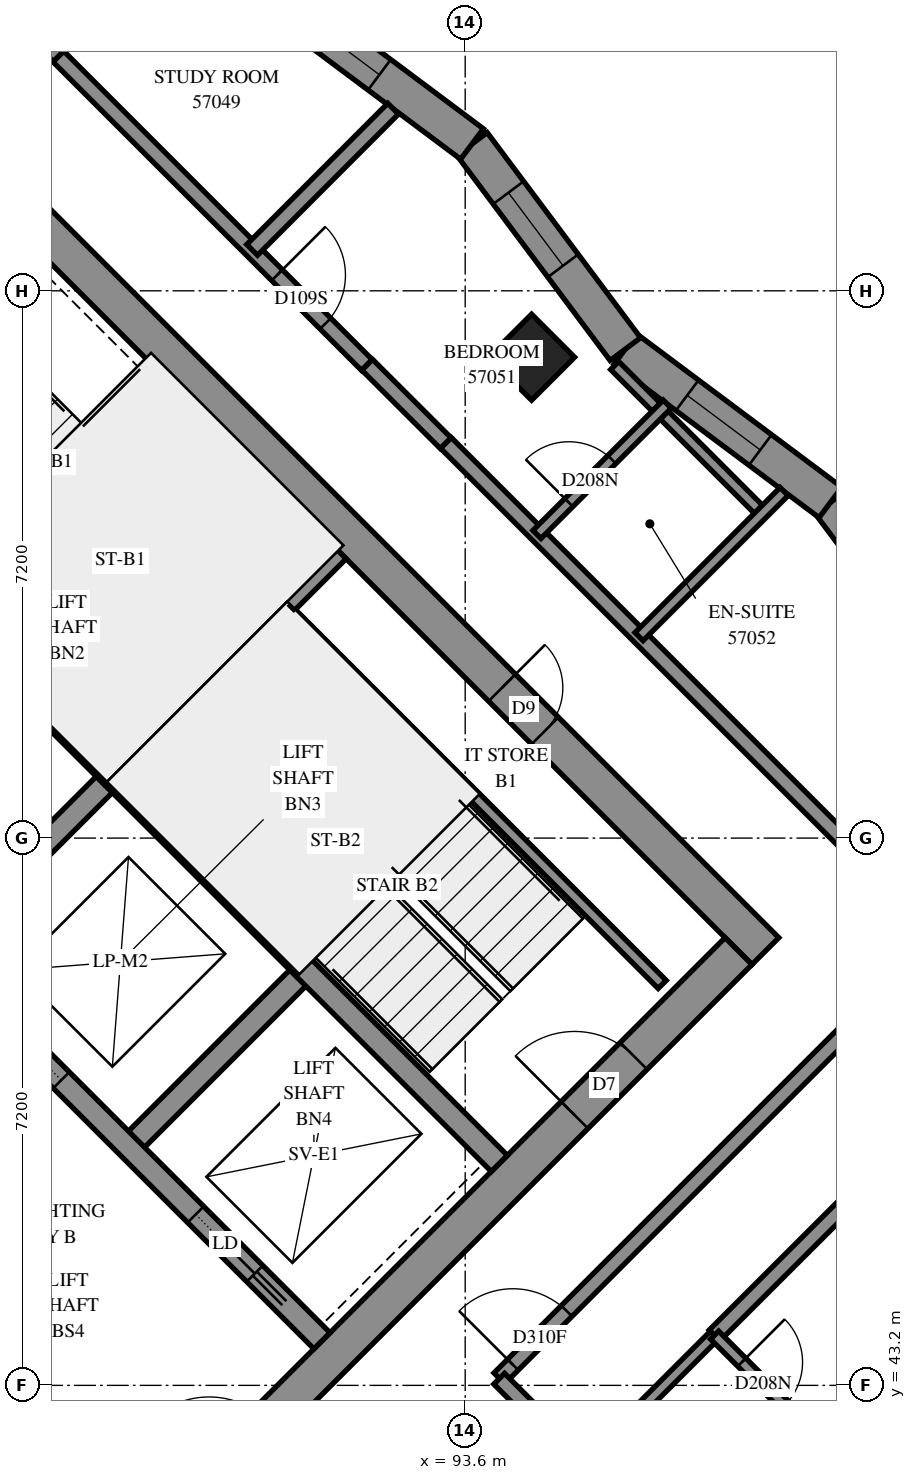
"""IFC4 building model, lengths in metres.
Left out: names, types, materials, properties, quantities, classifications, styles, units other than length and angle.
Written with IfcOpenShell. Run it as: python <this file> out.ifc"""

import sys

from ifc_helpers import new_model, si_unit, direction, frame, frame_2d, origin, origin_2d, place, context, subcontext, project, spatial, polyline, rectangle, outline, extrude, element, fill, save


model = new_model("IFC4")
c1 = context("Model", 3, precision=1e-05, world=origin(), true_north=direction((0.0, 1.0)))
c2 = subcontext(c1, "Body", "Model", "MODEL_VIEW")
j1 = project(units=[si_unit("LENGTHUNIT", "METRE"), si_unit("PLANEANGLEUNIT", "RADIAN")], contexts=[c1])
p1 = place(None, origin())
s1 = spatial("IfcSite", under=j1, at=p1, CompositionType="ELEMENT")
p2 = place(p1, origin())
s2 = spatial("IfcBuilding", under=s1, at=p2, CompositionType="ELEMENT")
p3 = place(p2, frame((0.0, 0.0, 210.0)))
s3 = spatial("IfcBuildingStorey", under=s2, at=p3, CompositionType="ELEMENT", Elevation=210.0)
p4 = place(p3, frame((94.474, 56.727, 0.0), z_axis=(0.0, 0.0, 1.0), x_axis=(0.7071067812, -0.7071067812, 0.0)))
e1 = element("IfcColumn", 1, at=p4, inside=s3, PredefinedType="COLUMN", context=c2, shape_type="SweptSolid", body=[
    extrude(rectangle(XDim=0.8, YDim=0.8, at=origin_2d()), origin(), (0.0, 0.0, 1.0), 3.1),
])
p5 = place(p3, frame((86.66, 59.802, -0.3), z_axis=(0.0, 0.0, 1.0), x_axis=(0.7071067812, -0.7071067812, 0.0)))
e2 = element("IfcWall", 2, at=p5, inside=s3, PredefinedType="SHEAR", context=c2, shape_type="SweptSolid", body=[
    extrude(rectangle(XDim=15.4, YDim=0.5, at=frame_2d((7.7, 0.0))), origin(), (0.0, 0.0, 1.0), 2.7),
])
p6 = place(p5, frame((10.5, 0.0, 0.3)))
e3 = element("IfcOpeningElement", 3, at=p6, cuts=e2, PredefinedType="OPENING", context=c2, shape_type="SweptSolid", body=[
    extrude(rectangle(XDim=0.8, YDim=2.1, at=frame_2d((0.4, 1.05))), frame((0.0, 0.26, 0.0), z_axis=(0.0, -1.0, 0.0), x_axis=(1.0, 0.0, 0.0)), (0.0, 0.0, 1.0), 0.52),
])
p7 = place(p3, frame((87.013, 38.731, -0.3), z_axis=(0.0, 0.0, 1.0), x_axis=(0.7071067812, 0.7071067812, 0.0)))
e4 = element("IfcWall", 4, at=p7, inside=s3, PredefinedType="SHEAR", context=c2, shape_type="SweptSolid", body=[
    extrude(rectangle(XDim=14.4, YDim=0.5, at=frame_2d((7.2, 0.0))), origin(), (0.0, 0.0, 1.0), 2.7),
])
p8 = place(p7, frame((4.55, 0.0, 0.3)))
e5 = element("IfcOpeningElement", 5, at=p8, cuts=e4, PredefinedType="OPENING", context=c2, shape_type="SweptSolid", body=[
    extrude(rectangle(XDim=1.1, YDim=2.1, at=frame_2d((0.55, 1.05))), frame((0.0, 0.26, 0.0), z_axis=(0.0, -1.0, 0.0), x_axis=(1.0, 0.0, 0.0)), (0.0, 0.0, 1.0), 0.52),
])
p9 = place(p7, frame((11.35, 0.0, 0.3)))
e6 = element("IfcOpeningElement", 6, at=p9, cuts=e4, PredefinedType="OPENING", context=c2, shape_type="SweptSolid", body=[
    extrude(rectangle(XDim=1.1, YDim=2.1, at=frame_2d((0.55, 1.05))), frame((0.0, 0.26, 0.0), z_axis=(0.0, -1.0, 0.0), x_axis=(1.0, 0.0, 0.0)), (0.0, 0.0, 1.0), 0.52),
])
for number, where, z_axis, x_axis in (
    (7, (86.625, 48.878, 0.0), (0.0, 0.0, 1.0), (0.707, 0.707, 0.0)),
    (8, (89.17, 46.332, 0.0), (0.0, 0.0, 1.0), (0.707, 0.707, 0.0)),
):
    element("IfcWall", number, at=place(p3, frame(where, z_axis=z_axis, x_axis=x_axis)), inside=s3, PredefinedType="SOLIDWALL", context=c2, shape_type="SweptSolid", body=[
        extrude(rectangle(XDim=3.3, YDim=0.3, at=frame_2d((1.65, 0.0))), origin(), (0.0, 0.0, 1.0), 3.1),
    ])
p10 = place(p3, frame((78.988, 51.423, 0.0), z_axis=(0.0, 0.0, 1.0), x_axis=(0.7071067812, -0.7071067812, 0.0)))
e9 = element("IfcWall", 9, at=p10, inside=s3, PredefinedType="SOLIDWALL", context=c2, shape_type="SweptSolid", body=[
    extrude(rectangle(XDim=14.4, YDim=0.3, at=frame_2d((7.2, 0.0))), origin(), (0.0, 0.0, 1.0), 3.1),
])
p11 = place(p10, frame((1.35, 0.0, 0.0)))
e10 = element("IfcOpeningElement", 10, at=p11, cuts=e9, PredefinedType="OPENING", context=c2, shape_type="SweptSolid", body=[
    extrude(rectangle(XDim=0.9, YDim=2.1, at=frame_2d((0.45, 1.05))), frame((0.0, 0.16, 0.0), z_axis=(0.0, -1.0, 0.0), x_axis=(1.0, 0.0, 0.0)), (0.0, 0.0, 1.0), 0.32),
])
p12 = place(p10, frame((4.95, 0.0, 0.0)))
e11 = element("IfcOpeningElement", 11, at=p12, cuts=e9, PredefinedType="OPENING", context=c2, shape_type="SweptSolid", body=[
    extrude(rectangle(XDim=0.9, YDim=2.1, at=frame_2d((0.45, 1.05))), frame((0.0, 0.16, 0.0), z_axis=(0.0, -1.0, 0.0), x_axis=(1.0, 0.0, 0.0)), (0.0, 0.0, 1.0), 0.32),
])
p13 = place(p10, frame((8.55, 0.0, 0.0)))
e12 = element("IfcOpeningElement", 12, at=p13, cuts=e9, PredefinedType="OPENING", context=c2, shape_type="SweptSolid", body=[
    extrude(rectangle(XDim=0.9, YDim=2.1, at=frame_2d((0.45, 1.05))), frame((0.0, 0.16, 0.0), z_axis=(0.0, -1.0, 0.0), x_axis=(1.0, 0.0, 0.0)), (0.0, 0.0, 1.0), 0.32),
])
p14 = place(p10, frame((12.05, 0.0, 0.0)))
e13 = element("IfcOpeningElement", 13, at=p14, cuts=e9, PredefinedType="OPENING", context=c2, shape_type="SweptSolid", body=[
    extrude(rectangle(XDim=1.1, YDim=2.1, at=frame_2d((0.55, 1.05))), frame((0.0, 0.16, 0.0), z_axis=(0.0, -1.0, 0.0), x_axis=(1.0, 0.0, 0.0)), (0.0, 0.0, 1.0), 0.32),
])
p15 = place(p3, frame((81.534, 53.969, 0.0), z_axis=(0.0, 0.0, 1.0), x_axis=(0.707103309, -0.7071102534, 0.0)))
e14 = element("IfcWall", 14, at=p15, inside=s3, PredefinedType="SOLIDWALL", context=c2, shape_type="SweptSolid", body=[
    extrude(rectangle(XDim=14.4, YDim=0.3, at=frame_2d((7.2, 0.0))), origin(), (0.0, 0.0, 1.0), 3.1),
])
p16 = place(p15, frame((1.25, 0.0, 0.0)))
e15 = element("IfcOpeningElement", 15, at=p16, cuts=e14, PredefinedType="OPENING", context=c2, shape_type="SweptSolid", body=[
    extrude(rectangle(XDim=1.1, YDim=2.1, at=frame_2d((0.55, 1.05))), frame((0.0, 0.16, 0.0), z_axis=(0.0, -1.0, 0.0), x_axis=(1.0, 0.0, 0.0)), (0.0, 0.0, 1.0), 0.32),
])
p17 = place(p15, frame((4.85, 0.0, 0.0)))
e16 = element("IfcOpeningElement", 16, at=p17, cuts=e14, PredefinedType="OPENING", context=c2, shape_type="SweptSolid", body=[
    extrude(rectangle(XDim=1.1, YDim=2.1, at=frame_2d((0.55, 1.05))), frame((0.0, 0.16, 0.0), z_axis=(0.0, -1.0, 0.0), x_axis=(1.0, 0.0, 0.0)), (0.0, 0.0, 1.0), 0.32),
])
p18 = place(p15, frame((8.45, 0.0, 0.0)))
e17 = element("IfcOpeningElement", 17, at=p18, cuts=e14, PredefinedType="OPENING", context=c2, shape_type="SweptSolid", body=[
    extrude(rectangle(XDim=1.1, YDim=2.1, at=frame_2d((0.55, 1.05))), frame((0.0, 0.16, 0.0), z_axis=(0.0, -1.0, 0.0), x_axis=(1.0, 0.0, 0.0)), (0.0, 0.0, 1.0), 0.32),
])
p19 = place(p15, frame((12.05, 0.0, 0.0)))
e18 = element("IfcOpeningElement", 18, at=p19, cuts=e14, PredefinedType="OPENING", context=c2, shape_type="SweptSolid", body=[
    extrude(rectangle(XDim=1.1, YDim=2.1, at=frame_2d((0.55, 1.05))), frame((0.0, 0.16, 0.0), z_axis=(0.0, -1.0, 0.0), x_axis=(1.0, 0.0, 0.0)), (0.0, 0.0, 1.0), 0.32),
])
for number, where, z_axis, x_axis in (
    (19, (83.867, 56.302, 0.0), (0.0, 0.0, 1.0), (0.707, -0.707, 0.0)),
    (20, (88.958, 51.211, 0.0), (0.0, 0.0, 1.0), (0.707, -0.707, 0.0)),
):
    element("IfcWall", number, at=place(p3, frame(where, z_axis=z_axis, x_axis=x_axis)), inside=s3, PredefinedType="SOLIDWALL", context=c2, shape_type="SweptSolid", body=[
        extrude(rectangle(XDim=7.2, YDim=0.3, at=frame_2d((3.6, 0.0))), origin(), (0.0, 0.0, 1.0), 3.1),
    ])
p20 = place(p3, frame((88.958, 51.211, 0.0), z_axis=(0.0, 0.0, 1.0), x_axis=(0.7071067812, 0.7071067812, 0.0)))
e21 = element("IfcWall", 21, at=p20, inside=s3, PredefinedType="SOLIDWALL", context=c2, shape_type="SweptSolid", body=[
    extrude(rectangle(XDim=4.2, YDim=0.3, at=frame_2d((2.1, 0.0))), origin(), (0.0, 0.0, 1.0), 3.1),
])
p21 = place(p3, frame((100.436, 52.1, 0.0), z_axis=(0.0, 0.0, 1.0), x_axis=(-0.5986733779, 0.8009932501, 0.0)))
e22 = element("IfcWall", 22, at=p21, inside=s3, PredefinedType="SOLIDWALL", context=c2, shape_type="SweptSolid", body=[
    extrude(outline(polyline([(0.058, -0.25), (3.427, -0.25), (3.355, 0.25), (-0.058, 0.25), (0.058, -0.25)])), origin(), (0.0, 0.0, 1.0), 3.1),
])
p22 = place(p21, frame((1.077, 0.0, 0.45)))
e23 = element("IfcOpeningElement", 23, at=p22, cuts=e22, PredefinedType="OPENING", context=c2, shape_type="SweptSolid", body=[
    extrude(rectangle(XDim=1.2, YDim=2.5, at=frame_2d((0.6, 1.25))), frame((0.0, 0.26, 0.0), z_axis=(0.0, -1.0, 0.0), x_axis=(1.0, 0.0, 0.0)), (0.0, 0.0, 1.0), 0.52),
])
p23 = place(p3, frame((98.405, 54.816, 0.0), z_axis=(0.0, 0.0, 1.0), x_axis=(-0.8009854957, 0.5986837527, 0.0)))
e24 = element("IfcWall", 24, at=p23, inside=s3, PredefinedType="SOLIDWALL", context=c2, shape_type="SweptSolid", body=[
    extrude(outline(polyline([(-0.036, -0.25), (3.333, -0.25), (3.405, 0.25), (0.036, 0.25), (-0.036, -0.25)])), origin(), (0.0, 0.0, 1.0), 3.1),
])
p24 = place(p23, frame((1.153, 0.0, 0.45)))
e25 = element("IfcOpeningElement", 25, at=p24, cuts=e24, PredefinedType="OPENING", context=c2, shape_type="SweptSolid", body=[
    extrude(rectangle(XDim=1.2, YDim=2.5, at=frame_2d((0.6, 1.25))), frame((0.0, 0.26, 0.0), z_axis=(0.0, -1.0, 0.0), x_axis=(1.0, 0.0, 0.0)), (0.0, 0.0, 1.0), 0.52),
])
p25 = place(p3, frame((95.707, 56.833, 0.0), z_axis=(0.0, 0.0, 1.0), x_axis=(-0.5986647099, 0.8009997286, 0.0)))
e26 = element("IfcWall", 26, at=p25, inside=s3, PredefinedType="SOLIDWALL", context=c2, shape_type="SweptSolid", body=[
    extrude(outline(polyline([(0.036, -0.25), (3.405, -0.25), (3.333, 0.25), (-0.036, 0.25), (0.036, -0.25)])), origin(), (0.0, 0.0, 1.0), 3.1),
])
p26 = place(p25, frame((1.369, 0.0, 0.45)))
e27 = element("IfcOpeningElement", 27, at=p26, cuts=e26, PredefinedType="OPENING", context=c2, shape_type="SweptSolid", body=[
    extrude(rectangle(XDim=1.2, YDim=2.5, at=frame_2d((0.6, 1.25))), frame((0.0, 0.26, 0.0), z_axis=(0.0, -1.0, 0.0), x_axis=(1.0, 0.0, 0.0)), (0.0, 0.0, 1.0), 0.52),
])
p27 = place(p3, frame((93.69, 59.532, 0.0), z_axis=(0.0, 0.0, 1.0), x_axis=(-0.8009997286, 0.5986647099, 0.0)))
e28 = element("IfcWall", 28, at=p27, inside=s3, PredefinedType="SOLIDWALL", context=c2, shape_type="SweptSolid", body=[
    extrude(outline(polyline([(-0.036, -0.25), (3.333, -0.25), (3.405, 0.25), (0.036, 0.25), (-0.036, -0.25)])), origin(), (0.0, 0.0, 1.0), 3.1),
])
p28 = place(p27, frame((1.521, 0.0, 0.45)))
e29 = element("IfcOpeningElement", 29, at=p28, cuts=e28, PredefinedType="OPENING", context=c2, shape_type="SweptSolid", body=[
    extrude(rectangle(XDim=1.2, YDim=2.5, at=frame_2d((0.6, 1.25))), frame((0.0, 0.26, 0.0), z_axis=(0.0, -1.0, 0.0), x_axis=(1.0, 0.0, 0.0)), (0.0, 0.0, 1.0), 0.52),
])
p29 = place(p3, frame((91.313, 53.354, 0.0), z_axis=(0.0, 0.0, 1.0), x_axis=(0.7071140275, -0.7070995348, 0.0)))
e30 = element("IfcWall", 30, at=p29, inside=s3, PredefinedType="PARTITIONING", context=c2, shape_type="SweptSolid", body=[
    extrude(rectangle(XDim=6.9, YDim=0.15, at=frame_2d((3.45, 0.0))), origin(), (0.0, 0.0, 1.0), 3.1),
])
p30 = place(p3, frame((93.346, 55.599, 0.0), z_axis=(0.0, 0.0, 1.0), x_axis=(0.7071067812, -0.7071067812, 0.0)))
e31 = element("IfcWall", 31, at=p30, inside=s3, PredefinedType="PARTITIONING", context=c2, shape_type="SweptSolid", body=[
    extrude(rectangle(XDim=9.201, YDim=0.2, at=frame_2d((4.601, 0.0))), origin(), (0.0, 0.0, 1.0), 3.1),
])
p31 = place(p3, frame((94.049, 43.293, 0.0), z_axis=(0.0, 0.0, 1.0), x_axis=(0.7071067812, 0.7071067812, 0.0)))
e32 = element("IfcWall", 32, at=p31, inside=s3, PredefinedType="PARTITIONING", context=c2, shape_type="SweptSolid", body=[
    extrude(rectangle(XDim=8.2, YDim=0.2, at=frame_2d((4.1, 0.0))), origin(), (0.0, 0.0, 1.0), 3.1),
])
p32 = place(p31, frame((0.252, 0.0, 0.0)))
e33 = element("IfcOpeningElement", 33, at=p32, cuts=e32, PredefinedType="OPENING", context=c2, shape_type="SweptSolid", body=[
    extrude(rectangle(XDim=1.0, YDim=2.1, at=frame_2d((0.5, 1.05))), frame((0.0, 0.11, 0.0), z_axis=(0.0, -1.0, 0.0), x_axis=(1.0, 0.0, 0.0)), (0.0, 0.0, 1.0), 0.22),
])
p33 = place(p3, frame((88.247, 60.683, 0.0), z_axis=(0.0, 0.0, 1.0), x_axis=(0.7071067812, -0.7071067812, 0.0)))
e34 = element("IfcWall", 34, at=p33, inside=s3, PredefinedType="PARTITIONING", context=c2, shape_type="SweptSolid", body=[
    extrude(rectangle(XDim=5.742, YDim=0.2, at=frame_2d((2.871, 0.0))), origin(), (0.0, 0.0, 1.0), 3.1),
])
p34 = place(p33, frame((4.069, 0.0, 0.0)))
e35 = element("IfcOpeningElement", 35, at=p34, cuts=e34, PredefinedType="OPENING", context=c2, shape_type="SweptSolid", body=[
    extrude(rectangle(XDim=0.9, YDim=2.1, at=frame_2d((0.45, 1.05))), frame((0.0, 0.11, 0.0), z_axis=(0.0, -1.0, 0.0), x_axis=(1.0, 0.0, 0.0)), (0.0, 0.0, 1.0), 0.22),
])
p35 = place(p3, frame((94.047, 43.287, 0.0), z_axis=(0.0, 0.0, 1.0), x_axis=(0.7071067812, -0.7071067812, 0.0)))
e36 = element("IfcWall", 36, at=p35, inside=s3, PredefinedType="PARTITIONING", context=c2, shape_type="SweptSolid", body=[
    extrude(rectangle(XDim=5.199, YDim=0.2, at=frame_2d((2.599, 0.0))), origin(), (0.0, 0.0, 1.0), 3.1),
])
p36 = place(p35, frame((3.898, 0.0, 0.0)))
e37 = element("IfcOpeningElement", 37, at=p36, cuts=e36, PredefinedType="OPENING", context=c2, shape_type="SweptSolid", body=[
    extrude(rectangle(XDim=0.9, YDim=2.1, at=frame_2d((0.45, 1.05))), frame((0.0, 0.11, 0.0), z_axis=(0.0, -1.0, 0.0), x_axis=(1.0, 0.0, 0.0)), (0.0, 0.0, 1.0), 0.22),
])
p37 = place(p3, frame((96.88, 43.856, 0.0), z_axis=(0.0, 0.0, 1.0), x_axis=(0.7074098182, 0.7068036142, 0.0)))
e38 = element("IfcWall", 38, at=p37, inside=s3, PredefinedType="PARTITIONING", context=c2, shape_type="SweptSolid", body=[
    extrude(rectangle(XDim=3.299, YDim=0.2, at=frame_2d((1.65, 0.0))), origin(), (0.0, 0.0, 1.0), 3.1),
])
p38 = place(p3, frame((95.567, 56.617, 0.0), z_axis=(0.0, 0.0, 1.0), x_axis=(0.7071249683, -0.7070885936, 0.0)))
e39 = element("IfcWall", 39, at=p38, inside=s3, PredefinedType="PARTITIONING", context=c2, shape_type="SweptSolid", body=[
    extrude(rectangle(XDim=2.749, YDim=0.15, at=frame_2d((1.375, 0.0))), origin(), (0.0, 0.0, 1.0), 3.1),
])
p39 = place(p3, frame((95.887, 53.051, 0.0), z_axis=(0.0, 0.0, 1.0), x_axis=(0.7070882582, 0.7071253037, 0.0)))
e40 = element("IfcWall", 40, at=p39, inside=s3, PredefinedType="PARTITIONING", context=c2, shape_type="SweptSolid", body=[
    extrude(rectangle(XDim=2.699, YDim=0.15, at=frame_2d((1.35, 0.0))), origin(), (0.0, 0.0, 1.0), 3.1),
])
p40 = place(p3, frame((90.797, 58.139, 0.0), z_axis=(0.0, 0.0, 1.0), x_axis=(0.7066493538, 0.7075639129, 0.0)))
e41 = element("IfcWall", 41, at=p40, inside=s3, PredefinedType="PARTITIONING", context=c2, shape_type="SweptSolid", body=[
    extrude(rectangle(XDim=2.624, YDim=0.2, at=frame_2d((1.312, 0.0))), origin(), (0.0, 0.0, 1.0), 3.1),
])
p41 = place(p3, frame((95.179, 42.161, 0.0), z_axis=(0.0, 0.0, 1.0), x_axis=(0.7071067812, 0.7071067812, 0.0)))
e42 = element("IfcWall", 42, at=p41, inside=s3, PredefinedType="PARTITIONING", context=c2, shape_type="SweptSolid", body=[
    extrude(rectangle(XDim=2.401, YDim=0.15, at=frame_2d((1.201, 0.0))), origin(), (0.0, 0.0, 1.0), 3.1),
])
p42 = place(p3, frame((94.544, 54.394, 0.0), z_axis=(0.0, 0.0, 1.0), x_axis=(0.7070861601, 0.7071274017, 0.0)))
e43 = element("IfcWall", 43, at=p42, inside=s3, PredefinedType="PARTITIONING", context=c2, shape_type="SweptSolid", body=[
    extrude(rectangle(XDim=2.425, YDim=0.15, at=frame_2d((1.212, 0.0))), origin(), (0.0, 0.0, 1.0), 3.1),
])
p43 = place(p42, frame((0.594, 0.0, 0.0)))
e44 = element("IfcOpeningElement", 44, at=p43, cuts=e43, PredefinedType="OPENING", context=c2, shape_type="SweptSolid", body=[
    extrude(rectangle(XDim=0.8, YDim=2.1, at=frame_2d((0.4, 1.05))), frame((0.0, 0.085, 0.0), z_axis=(0.0, -1.0, 0.0), x_axis=(1.0, 0.0, 0.0)), (0.0, 0.0, 1.0), 0.17),
])
p44 = place(p3, frame((96.881, 43.861, 0.0), z_axis=(0.0, 0.0, 1.0), x_axis=(0.7071067812, -0.7071067812, 0.0)))
e45 = element("IfcWall", 45, at=p44, inside=s3, PredefinedType="PARTITIONING", context=c2, shape_type="SweptSolid", body=[
    extrude(rectangle(XDim=1.901, YDim=0.15, at=frame_2d((0.95, 0.0))), origin(), (0.0, 0.0, 1.0), 3.1),
])
p45 = place(p44, frame((0.505, 0.0, 0.0)))
e46 = element("IfcOpeningElement", 46, at=p45, cuts=e45, PredefinedType="OPENING", context=c2, shape_type="SweptSolid", body=[
    extrude(rectangle(XDim=0.8, YDim=2.1, at=frame_2d((0.4, 1.05))), frame((0.0, 0.085, 0.0), z_axis=(0.0, -1.0, 0.0), x_axis=(1.0, 0.0, 0.0)), (0.0, 0.0, 1.0), 0.17),
])
p46 = place(p3, frame((92.311, 56.627, 0.0), z_axis=(0.0, 0.0, 1.0), x_axis=(0.7077922938, -0.7064206033, 0.0)))
e47 = element("IfcWall", 47, at=p46, inside=s3, PredefinedType="PARTITIONING", context=c2, shape_type="SweptSolid", body=[
    extrude(rectangle(XDim=1.458, YDim=0.2, at=frame_2d((0.729, 0.0))), origin(), (0.0, 0.0, 1.0), 3.1),
])
p47 = place(p3, frame((87.899, 61.041, 0.0), z_axis=(0.0, 0.0, 1.0), x_axis=(0.7051008166, -0.7091070712, 0.0)))
e48 = element("IfcWall", 48, at=p47, inside=s3, PredefinedType="PARTITIONING", context=c2, shape_type="SweptSolid", body=[
    extrude(rectangle(XDim=0.499, YDim=0.2, at=frame_2d((0.25, 0.0))), origin(), (0.0, 0.0, 1.0), 3.1),
])
p48 = place(p24, origin())
e49 = element("IfcWindow", 49, at=p48, inside=s3, PartitioningType="SINGLE_PANEL", PredefinedType="WINDOW", context=c2, shape_type="SweptSolid", body=[
    extrude(rectangle(XDim=1.2, YDim=2.5, at=frame_2d((0.6, 1.25))), frame((0.0, 0.18, 0.0), z_axis=(0.0, -1.0, 0.0), x_axis=(1.0, 0.0, 0.0)), (0.0, 0.0, 1.0), 0.06),
])
fill(e25, e49)
p49 = place(p26, origin())
e50 = element("IfcWindow", 50, at=p49, inside=s3, PartitioningType="SINGLE_PANEL", PredefinedType="WINDOW", context=c2, shape_type="SweptSolid", body=[
    extrude(rectangle(XDim=1.2, YDim=2.5, at=frame_2d((0.6, 1.25))), frame((0.0, 0.18, 0.0), z_axis=(0.0, -1.0, 0.0), x_axis=(1.0, 0.0, 0.0)), (0.0, 0.0, 1.0), 0.06),
])
fill(e27, e50)
p50 = place(p28, origin())
e51 = element("IfcWindow", 51, at=p50, inside=s3, PartitioningType="SINGLE_PANEL", PredefinedType="WINDOW", context=c2, shape_type="SweptSolid", body=[
    extrude(rectangle(XDim=1.2, YDim=2.5, at=frame_2d((0.6, 1.25))), frame((0.0, 0.18, 0.0), z_axis=(0.0, -1.0, 0.0), x_axis=(1.0, 0.0, 0.0)), (0.0, 0.0, 1.0), 0.06),
])
fill(e29, e51)
p51 = place(p6, origin())
e52 = element("IfcDoor", 52, at=p51, inside=s3, OperationType="SINGLE_SWING_RIGHT", PredefinedType="DOOR", context=c2, shape_type="SweptSolid", body=[
    extrude(rectangle(XDim=0.8, YDim=2.1, at=frame_2d((0.4, 1.05))), frame((0.0, 0.025, 0.0), z_axis=(0.0, -1.0, 0.0), x_axis=(1.0, 0.0, 0.0)), (0.0, 0.0, 1.0), 0.05),
])
fill(e3, e52)
p52 = place(p9, origin())
e53 = element("IfcDoor", 53, at=p52, inside=s3, OperationType="SINGLE_SWING_RIGHT", PredefinedType="DOOR", context=c2, shape_type="SweptSolid", body=[
    extrude(rectangle(XDim=1.1, YDim=2.1, at=frame_2d((0.55, 1.05))), frame((0.0, 0.025, 0.0), z_axis=(0.0, -1.0, 0.0), x_axis=(1.0, 0.0, 0.0)), (0.0, 0.0, 1.0), 0.05),
])
fill(e6, e53)
p53 = place(p18, origin())
e54 = element("IfcDoor", 54, at=p53, inside=s3, OperationType="SLIDING_TO_LEFT", PredefinedType="DOOR", context=c2, shape_type="SweptSolid", body=[
    extrude(rectangle(XDim=1.1, YDim=2.1, at=frame_2d((0.55, 1.05))), frame((0.0, 0.025, 0.0), z_axis=(0.0, -1.0, 0.0), x_axis=(1.0, 0.0, 0.0)), (0.0, 0.0, 1.0), 0.05),
])
fill(e17, e54)
p54 = place(p19, origin())
e55 = element("IfcDoor", 55, at=p54, inside=s3, OperationType="SLIDING_TO_RIGHT", PredefinedType="DOOR", context=c2, shape_type="SweptSolid", body=[
    extrude(rectangle(XDim=1.1, YDim=2.1, at=frame_2d((0.55, 1.05))), frame((0.0, 0.025, 0.0), z_axis=(0.0, -1.0, 0.0), x_axis=(1.0, 0.0, 0.0)), (0.0, 0.0, 1.0), 0.05),
])
fill(e18, e55)
p55 = place(p32, origin())
e56 = element("IfcDoor", 56, at=p55, inside=s3, OperationType="SINGLE_SWING_RIGHT", PredefinedType="DOOR", context=c2, shape_type="SweptSolid", body=[
    extrude(rectangle(XDim=1.0, YDim=2.1, at=frame_2d((0.5, 1.05))), frame((0.0, 0.025, 0.0), z_axis=(0.0, -1.0, 0.0), x_axis=(1.0, 0.0, 0.0)), (0.0, 0.0, 1.0), 0.05),
])
fill(e33, e56)
p56 = place(p34, origin())
e57 = element("IfcDoor", 57, at=p56, inside=s3, OperationType="SINGLE_SWING_RIGHT", PredefinedType="DOOR", context=c2, shape_type="SweptSolid", body=[
    extrude(rectangle(XDim=0.9, YDim=2.1, at=frame_2d((0.45, 1.05))), frame((0.0, 0.025, 0.0), z_axis=(0.0, -1.0, 0.0), x_axis=(1.0, 0.0, 0.0)), (0.0, 0.0, 1.0), 0.05),
])
fill(e35, e57)
p57 = place(p43, origin())
e58 = element("IfcDoor", 58, at=p57, inside=s3, OperationType="SINGLE_SWING_RIGHT", PredefinedType="DOOR", context=c2, shape_type="SweptSolid", body=[
    extrude(rectangle(XDim=0.8, YDim=2.1, at=frame_2d((0.4, 1.05))), frame((0.0, 0.025, 0.0), z_axis=(0.0, -1.0, 0.0), x_axis=(1.0, 0.0, 0.0)), (0.0, 0.0, 1.0), 0.05),
])
fill(e44, e58)
p58 = place(p45, origin())
e59 = element("IfcDoor", 59, at=p58, inside=s3, OperationType="SINGLE_SWING_RIGHT", PredefinedType="DOOR", context=c2, shape_type="SweptSolid", body=[
    extrude(rectangle(XDim=0.8, YDim=2.1, at=frame_2d((0.4, 1.05))), frame((0.0, 0.025, 0.0), z_axis=(0.0, -1.0, 0.0), x_axis=(1.0, 0.0, 0.0)), (0.0, 0.0, 1.0), 0.05),
])
fill(e46, e59)
save(model, sys.argv[1])
